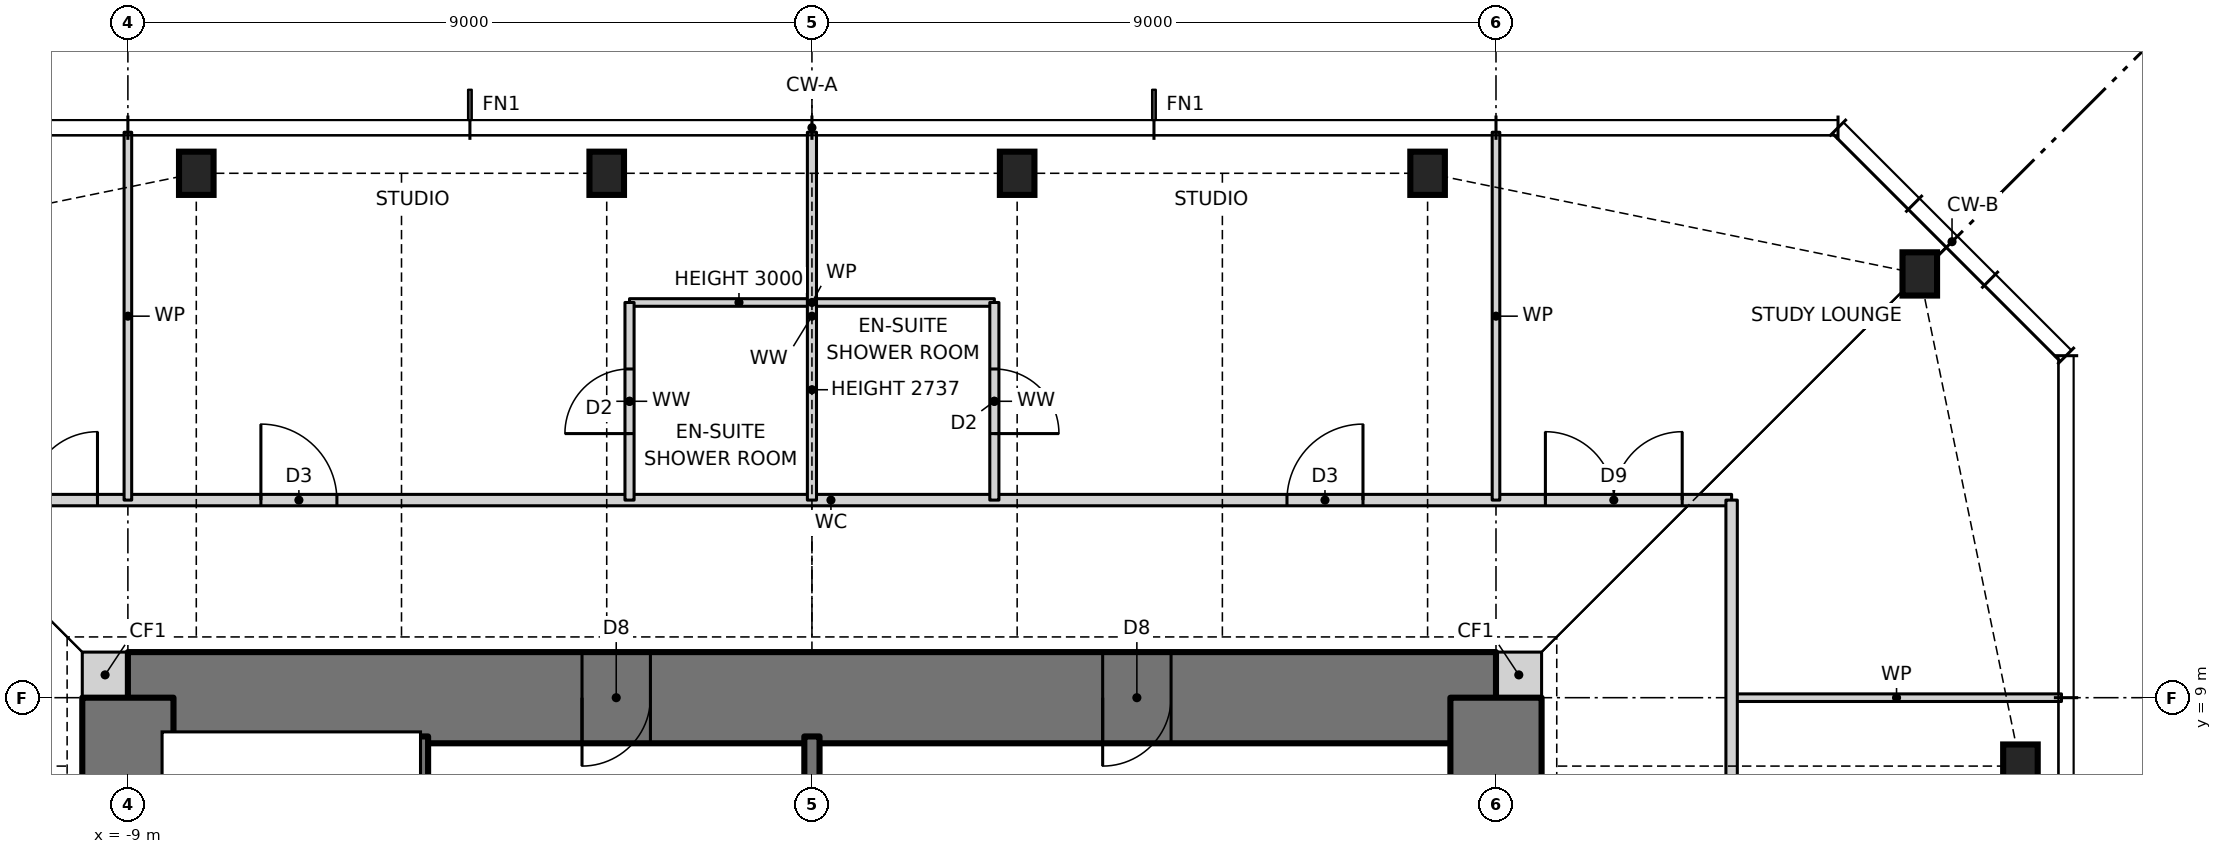
"""IFC4 building model, lengths in metres.
Left out: names, types, materials, properties, quantities, classifications, styles, units other than length and angle.
Written with IfcOpenShell. Run it as: python <this file> out.ifc"""

import sys

from ifc_helpers import new_model, si_unit, direction, frame, frame_2d, origin, origin_2d, place, context, subcontext, project, spatial, rectangle, i_section, extrude, element, fill, save


model = new_model("IFC4")
c1 = context("Model", 3, precision=1e-05, world=origin(), true_north=direction((0.0, 1.0)))
c2 = subcontext(c1, "Body", "Model", "MODEL_VIEW")
j1 = project(units=[si_unit("LENGTHUNIT", "METRE"), si_unit("PLANEANGLEUNIT", "RADIAN")], contexts=[c1])
p1 = place(None, origin())
s1 = spatial("IfcSite", under=j1, at=p1, CompositionType="ELEMENT")
p2 = place(p1, origin())
s2 = spatial("IfcBuilding", under=s1, at=p2, CompositionType="ELEMENT")
p3 = place(p2, frame((0.0, 0.0, 253.5)))
s3 = spatial("IfcBuildingStorey", under=s2, at=p3, CompositionType="ELEMENT", Elevation=253.5)
for number, where, z_axis, x_axis in (
    (1, (15.9, 8.1, 0.0), (0.0, 0.0, 1.0), (1.0, 0.0, 0.0)),
    (2, (14.576, 14.576, 0.0), (0.0, 0.0, 1.0), (1.0, 0.0, 0.0)),
    (3, (8.1, 15.9, 0.0), (0.0, 0.0, 1.0), (1.0, 0.0, 0.0)),
    (4, (2.7, 15.9, 0.0), (0.0, 0.0, 1.0), (1.0, 0.0, 0.0)),
    (5, (-2.7, 15.9, 0.0), (0.0, 0.0, 1.0), (1.0, 0.0, 0.0)),
    (6, (-8.1, 15.9, 0.0), (0.0, 0.0, 1.0), (1.0, 0.0, 0.0)),
):
    element("IfcColumn", number, at=place(p3, frame(where, z_axis=z_axis, x_axis=x_axis)), inside=s3, PredefinedType="COLUMN", context=c2, shape_type="SweptSolid", body=[
        extrude(i_section(OverallWidth=0.455, OverallDepth=0.569, WebThickness=0.078, FlangeThickness=0.125, at=origin_2d()), origin(), (0.0, 0.0, 1.0), 3.5),
    ])
for number, where, z_axis, x_axis in (
    (7, (9.0, 9.3, 0.0), (0.0, 0.0, 1.0), (1.0, 0.0, 0.0)),
    (8, (-9.6, 9.3, 0.0), (0.0, 0.0, 1.0), (1.0, 0.0, 0.0)),
):
    element("IfcWall", number, at=place(p3, frame(where, z_axis=z_axis, x_axis=x_axis)), inside=s3, PredefinedType="SOLIDWALL", context=c2, shape_type="SweptSolid", body=[
        extrude(rectangle(XDim=0.6, YDim=0.6, at=frame_2d((0.3, 0.0))), origin(), (0.0, 0.0, 1.0), 3.5),
    ])
p4 = place(p3, frame((9.0, 9.0, 0.0), z_axis=(0.0, 0.0, 1.0), x_axis=(-1.0, 0.0, 0.0)))
e9 = element("IfcWall", 9, at=p4, inside=s3, PredefinedType="SHEAR", context=c2, shape_type="SweptSolid", body=[
    extrude(rectangle(XDim=18.0, YDim=1.2, at=frame_2d((9.0, 0.0))), origin(), (0.0, 0.0, 1.0), 3.5),
])
p5 = place(p4, frame((11.125, 0.0, 0.0)))
e10 = element("IfcOpeningElement", 10, at=p5, cuts=e9, PredefinedType="OPENING", context=c2, shape_type="SweptSolid", body=[
    extrude(rectangle(XDim=0.9, YDim=2.1, at=frame_2d((0.45, 1.05))), frame((0.0, 0.61, 0.0), z_axis=(0.0, -1.0, 0.0), x_axis=(1.0, 0.0, 0.0)), (0.0, 0.0, 1.0), 1.22),
])
p6 = place(p4, frame((4.275, 0.0, 0.0)))
e11 = element("IfcOpeningElement", 11, at=p6, cuts=e9, PredefinedType="OPENING", context=c2, shape_type="SweptSolid", body=[
    extrude(rectangle(XDim=0.9, YDim=2.1, at=frame_2d((0.45, 1.05))), frame((0.0, 0.61, 0.0), z_axis=(0.0, -1.0, 0.0), x_axis=(1.0, 0.0, 0.0)), (0.0, 0.0, 1.0), 1.22),
])
p7 = place(p3, frame((9.0, -9.0, 0.0), z_axis=(0.0, 0.0, 1.0), x_axis=(0.0, 1.0, 0.0)))
e12 = element("IfcWall", 12, at=p7, inside=s3, PredefinedType="SHEAR", context=c2, shape_type="SweptSolid", body=[
    extrude(rectangle(XDim=18.0, YDim=1.2, at=frame_2d((9.0, 0.0))), origin(), (0.0, 0.0, 1.0), 3.5),
])
p8 = place(p7, frame((8.5, 0.0, 0.0)))
e13 = element("IfcOpeningElement", 13, at=p8, cuts=e12, PredefinedType="OPENING", context=c2, shape_type="SweptSolid", body=[
    extrude(rectangle(XDim=1.0, YDim=2.1, at=frame_2d((0.5, 1.05))), frame((0.0, 0.61, 0.0), z_axis=(0.0, -1.0, 0.0), x_axis=(1.0, 0.0, 0.0)), (0.0, 0.0, 1.0), 1.22),
])
p9 = place(p3, frame((-9.0, 9.0, 0.0), z_axis=(0.0, 0.0, 1.0), x_axis=(0.0, -1.0, 0.0)))
e14 = element("IfcWall", 14, at=p9, inside=s3, PredefinedType="SHEAR", context=c2, shape_type="SweptSolid", body=[
    extrude(rectangle(XDim=18.0, YDim=1.2, at=frame_2d((9.0, 0.0))), origin(), (0.0, 0.0, 1.0), 3.5),
])
p10 = place(p9, frame((8.5, 0.0, 0.0)))
e15 = element("IfcOpeningElement", 15, at=p10, cuts=e14, PredefinedType="OPENING", context=c2, shape_type="SweptSolid", body=[
    extrude(rectangle(XDim=1.0, YDim=2.1, at=frame_2d((0.5, 1.05))), frame((0.0, 0.61, 0.0), z_axis=(0.0, -1.0, 0.0), x_axis=(1.0, 0.0, 0.0)), (0.0, 0.0, 1.0), 1.22),
])
p11 = place(p3, frame((12.1, 9.0, 0.0), z_axis=(0.0, 0.0, 1.0), x_axis=(1.0, 0.0, 0.0)))
e16 = element("IfcWall", 16, at=p11, inside=s3, PredefinedType="PARTITIONING", context=c2, shape_type="SweptSolid", body=[
    extrude(rectangle(XDim=4.34, YDim=0.1, at=frame_2d((2.17, 0.0))), origin(), (0.0, 0.0, 1.0), 3.27),
])
p12 = place(p3, frame((-11.6, 11.6, 0.0), z_axis=(0.0, 0.0, 1.0), x_axis=(1.0, 0.0, 0.0)))
e17 = element("IfcWall", 17, at=p12, inside=s3, PredefinedType="PARTITIONING", context=c2, shape_type="SweptSolid", body=[
    extrude(rectangle(XDim=23.7, YDim=0.15, at=frame_2d((11.85, 0.0))), origin(), (0.0, 0.0, 1.0), 3.27),
])
p13 = place(p12, frame((17.85, 0.0, 0.0)))
e18 = element("IfcOpeningElement", 18, at=p13, cuts=e17, PredefinedType="OPENING", context=c2, shape_type="SweptSolid", body=[
    extrude(rectangle(XDim=1.0, YDim=2.1, at=frame_2d((0.5, 1.05))), frame((0.0, 0.085, 0.0), z_axis=(0.0, -1.0, 0.0), x_axis=(1.0, 0.0, 0.0)), (0.0, 0.0, 1.0), 0.17),
])
p14 = place(p12, frame((4.35, 0.0, 0.0)))
e19 = element("IfcOpeningElement", 19, at=p14, cuts=e17, PredefinedType="OPENING", context=c2, shape_type="SweptSolid", body=[
    extrude(rectangle(XDim=1.0, YDim=2.1, at=frame_2d((0.5, 1.05))), frame((0.0, 0.085, 0.0), z_axis=(0.0, -1.0, 0.0), x_axis=(1.0, 0.0, 0.0)), (0.0, 0.0, 1.0), 0.17),
])
p15 = place(p12, frame((0.4, 0.0, 0.0)))
e20 = element("IfcOpeningElement", 20, at=p15, cuts=e17, PredefinedType="OPENING", context=c2, shape_type="SweptSolid", body=[
    extrude(rectangle(XDim=1.8, YDim=2.1, at=frame_2d((0.9, 1.05))), frame((0.0, 0.085, 0.0), z_axis=(0.0, -1.0, 0.0), x_axis=(1.0, 0.0, 0.0)), (0.0, 0.0, 1.0), 0.17),
])
p16 = place(p12, frame((21.25, 0.0, 0.0)))
e21 = element("IfcOpeningElement", 21, at=p16, cuts=e17, PredefinedType="OPENING", context=c2, shape_type="SweptSolid", body=[
    extrude(rectangle(XDim=1.8, YDim=2.1, at=frame_2d((0.9, 1.05))), frame((0.0, 0.085, 0.0), z_axis=(0.0, -1.0, 0.0), x_axis=(1.0, 0.0, 0.0)), (0.0, 0.0, 1.0), 0.17),
])
p17 = place(p3, frame((-2.4, 14.2, 0.0), z_axis=(0.0, 0.0, 1.0), x_axis=(1.0, 0.0, 0.0)))
e22 = element("IfcWall", 22, at=p17, inside=s3, PredefinedType="PARTITIONING", context=c2, shape_type="SweptSolid", body=[
    extrude(rectangle(XDim=4.8, YDim=0.1, at=frame_2d((2.4, 0.0))), origin(), (0.0, 0.0, 1.0), 3.0),
])
p18 = place(p3, frame((12.1, -11.6, 0.0), z_axis=(0.0, 0.0, 1.0), x_axis=(0.0, 1.0, 0.0)))
e23 = element("IfcWall", 23, at=p18, inside=s3, PredefinedType="PARTITIONING", context=c2, shape_type="SweptSolid", body=[
    extrude(rectangle(XDim=23.2, YDim=0.15, at=frame_2d((11.6, 0.0))), origin(), (0.0, 0.0, 1.0), 3.27),
])
p19 = place(p18, frame((5.7, 0.0, 0.0)))
e24 = element("IfcOpeningElement", 24, at=p19, cuts=e23, PredefinedType="OPENING", context=c2, shape_type="SweptSolid", body=[
    extrude(rectangle(XDim=1.0, YDim=2.1, at=frame_2d((0.5, 1.05))), frame((0.0, 0.085, 0.0), z_axis=(0.0, -1.0, 0.0), x_axis=(1.0, 0.0, 0.0)), (0.0, 0.0, 1.0), 0.17),
])
p20 = place(p18, frame((17.85, 0.0, 0.0)))
e25 = element("IfcOpeningElement", 25, at=p20, cuts=e23, PredefinedType="OPENING", context=c2, shape_type="SweptSolid", body=[
    extrude(rectangle(XDim=1.0, YDim=2.1, at=frame_2d((0.5, 1.05))), frame((0.0, 0.085, 0.0), z_axis=(0.0, -1.0, 0.0), x_axis=(1.0, 0.0, 0.0)), (0.0, 0.0, 1.0), 0.17),
])
p21 = place(p3, frame((9.0, 11.6, 0.0), z_axis=(0.0, 0.0, 1.0), x_axis=(0.0, 1.0, 0.0)))
e26 = element("IfcWall", 26, at=p21, inside=s3, PredefinedType="PARTITIONING", context=c2, shape_type="SweptSolid", body=[
    extrude(rectangle(XDim=4.84, YDim=0.1, at=frame_2d((2.42, 0.0))), origin(), (0.0, 0.0, 1.0), 3.27),
])
p22 = place(p3, frame((2.4, 11.6, 0.0), z_axis=(0.0, 0.0, 1.0), x_axis=(0.0, 1.0, 0.0)))
e27 = element("IfcWall", 27, at=p22, inside=s3, PredefinedType="PARTITIONING", context=c2, shape_type="SweptSolid", body=[
    extrude(rectangle(XDim=2.6, YDim=0.12, at=frame_2d((1.3, 0.0))), origin(), (0.0, 0.0, 1.0), 3.27),
])
p23 = place(p22, frame((0.875, 0.0, 0.0)))
e28 = element("IfcOpeningElement", 28, at=p23, cuts=e27, PredefinedType="OPENING", context=c2, shape_type="SweptSolid", body=[
    extrude(rectangle(XDim=0.85, YDim=2.1, at=frame_2d((0.425, 1.05))), frame((0.0, 0.07, 0.0), z_axis=(0.0, -1.0, 0.0), x_axis=(1.0, 0.0, 0.0)), (0.0, 0.0, 1.0), 0.14),
])
p24 = place(p3, frame((0.0, 4.4, 0.0), z_axis=(0.0, 0.0, 1.0), x_axis=(0.0, 1.0, 0.0)))
e29 = element("IfcWall", 29, at=p24, inside=s3, PredefinedType="SOLIDWALL", context=c2, shape_type="SweptSolid", body=[
    extrude(rectangle(XDim=4.09, YDim=0.2, at=frame_2d((2.045, 0.0))), origin(), (0.0, 0.0, 1.0), 3.5),
])
p25 = place(p3, frame((0.0, 11.6, 0.0), z_axis=(0.0, 0.0, 1.0), x_axis=(0.0, 1.0, 0.0)))
e30 = element("IfcWall", 30, at=p25, inside=s3, PredefinedType="PARTITIONING", context=c2, shape_type="SweptSolid", body=[
    extrude(rectangle(XDim=4.84, YDim=0.12, at=frame_2d((2.42, 0.0))), origin(), (0.0, 0.0, 1.0), 2.737),
])
p26 = place(p3, frame((-2.4, 11.6, 0.0), z_axis=(0.0, 0.0, 1.0), x_axis=(0.0, 1.0, 0.0)))
e31 = element("IfcWall", 31, at=p26, inside=s3, PredefinedType="PARTITIONING", context=c2, shape_type="SweptSolid", body=[
    extrude(rectangle(XDim=2.6, YDim=0.12, at=frame_2d((1.3, 0.0))), origin(), (0.0, 0.0, 1.0), 3.27),
])
p27 = place(p26, frame((0.875, 0.0, 0.0)))
e32 = element("IfcOpeningElement", 32, at=p27, cuts=e31, PredefinedType="OPENING", context=c2, shape_type="SweptSolid", body=[
    extrude(rectangle(XDim=0.85, YDim=2.1, at=frame_2d((0.425, 1.05))), frame((0.0, 0.07, 0.0), z_axis=(0.0, -1.0, 0.0), x_axis=(1.0, 0.0, 0.0)), (0.0, 0.0, 1.0), 0.14),
])
p28 = place(p3, frame((-5.15, 1.6, 0.0), z_axis=(0.0, 0.0, 1.0), x_axis=(0.0, 1.0, 0.0)))
e33 = element("IfcWall", 33, at=p28, inside=s3, PredefinedType="SOLIDWALL", context=c2, shape_type="SweptSolid", body=[
    extrude(rectangle(XDim=6.89, YDim=0.2, at=frame_2d((3.445, 0.0))), origin(), (0.0, 0.0, 1.0), 3.5),
])
p29 = place(p3, frame((-9.0, 11.6, 0.0), z_axis=(0.0, 0.0, 1.0), x_axis=(0.0, 1.0, 0.0)))
e34 = element("IfcWall", 34, at=p29, inside=s3, PredefinedType="PARTITIONING", context=c2, shape_type="SweptSolid", body=[
    extrude(rectangle(XDim=4.84, YDim=0.1, at=frame_2d((2.42, 0.0))), origin(), (0.0, 0.0, 1.0), 3.27),
])
p30 = place(p13, origin())
e35 = element("IfcDoor", 35, at=p30, inside=s3, OperationType="SINGLE_SWING_RIGHT", PredefinedType="DOOR", context=c2, shape_type="SweptSolid", body=[
    extrude(rectangle(XDim=1.0, YDim=2.1, at=frame_2d((0.5, 1.05))), frame((0.0, 0.025, 0.0), z_axis=(0.0, -1.0, 0.0), x_axis=(1.0, 0.0, 0.0)), (0.0, 0.0, 1.0), 0.05),
])
fill(e18, e35)
p31 = place(p23, frame((0.85, 0.0, 0.0), z_axis=(0.0, 0.0, 1.0), x_axis=(-1.0, 0.0, 0.0)))
e36 = element("IfcDoor", 36, at=p31, inside=s3, OperationType="SINGLE_SWING_RIGHT", PredefinedType="DOOR", context=c2, shape_type="SweptSolid", body=[
    extrude(rectangle(XDim=0.85, YDim=2.1, at=frame_2d((0.425, 1.05))), frame((0.0, 0.025, 0.0), z_axis=(0.0, -1.0, 0.0), x_axis=(1.0, 0.0, 0.0)), (0.0, 0.0, 1.0), 0.05),
])
fill(e28, e36)
p32 = place(p14, origin())
e37 = element("IfcDoor", 37, at=p32, inside=s3, OperationType="SINGLE_SWING_LEFT", PredefinedType="DOOR", context=c2, shape_type="SweptSolid", body=[
    extrude(rectangle(XDim=1.0, YDim=2.1, at=frame_2d((0.5, 1.05))), frame((0.0, 0.025, 0.0), z_axis=(0.0, -1.0, 0.0), x_axis=(1.0, 0.0, 0.0)), (0.0, 0.0, 1.0), 0.05),
])
fill(e19, e37)
p33 = place(p27, origin())
e38 = element("IfcDoor", 38, at=p33, inside=s3, OperationType="SINGLE_SWING_LEFT", PredefinedType="DOOR", context=c2, shape_type="SweptSolid", body=[
    extrude(rectangle(XDim=0.85, YDim=2.1, at=frame_2d((0.425, 1.05))), frame((0.0, 0.025, 0.0), z_axis=(0.0, -1.0, 0.0), x_axis=(1.0, 0.0, 0.0)), (0.0, 0.0, 1.0), 0.05),
])
fill(e32, e38)
p34 = place(p15, origin())
e39 = element("IfcDoor", 39, at=p34, inside=s3, OperationType="DOUBLE_DOOR_SINGLE_SWING", PredefinedType="DOOR", context=c2, shape_type="SweptSolid", body=[
    extrude(rectangle(XDim=1.8, YDim=2.1, at=frame_2d((0.9, 1.05))), frame((0.0, 0.025, 0.0), z_axis=(0.0, -1.0, 0.0), x_axis=(1.0, 0.0, 0.0)), (0.0, 0.0, 1.0), 0.05),
])
fill(e20, e39)
p35 = place(p16, origin())
e40 = element("IfcDoor", 40, at=p35, inside=s3, OperationType="DOUBLE_DOOR_SINGLE_SWING", PredefinedType="DOOR", context=c2, shape_type="SweptSolid", body=[
    extrude(rectangle(XDim=1.8, YDim=2.1, at=frame_2d((0.9, 1.05))), frame((0.0, 0.025, 0.0), z_axis=(0.0, -1.0, 0.0), x_axis=(1.0, 0.0, 0.0)), (0.0, 0.0, 1.0), 0.05),
])
fill(e21, e40)
p36 = place(p5, origin())
e41 = element("IfcDoor", 41, at=p36, inside=s3, OperationType="SINGLE_SWING_RIGHT", PredefinedType="DOOR", context=c2, shape_type="SweptSolid", body=[
    extrude(rectangle(XDim=0.9, YDim=2.1, at=frame_2d((0.45, 1.05))), frame((0.0, 0.025, 0.0), z_axis=(0.0, -1.0, 0.0), x_axis=(1.0, 0.0, 0.0)), (0.0, 0.0, 1.0), 0.05),
])
fill(e10, e41)
p37 = place(p6, origin())
e42 = element("IfcDoor", 42, at=p37, inside=s3, OperationType="SINGLE_SWING_RIGHT", PredefinedType="DOOR", context=c2, shape_type="SweptSolid", body=[
    extrude(rectangle(XDim=0.9, YDim=2.1, at=frame_2d((0.45, 1.05))), frame((0.0, 0.025, 0.0), z_axis=(0.0, -1.0, 0.0), x_axis=(1.0, 0.0, 0.0)), (0.0, 0.0, 1.0), 0.05),
])
fill(e11, e42)
save(model, sys.argv[1])
